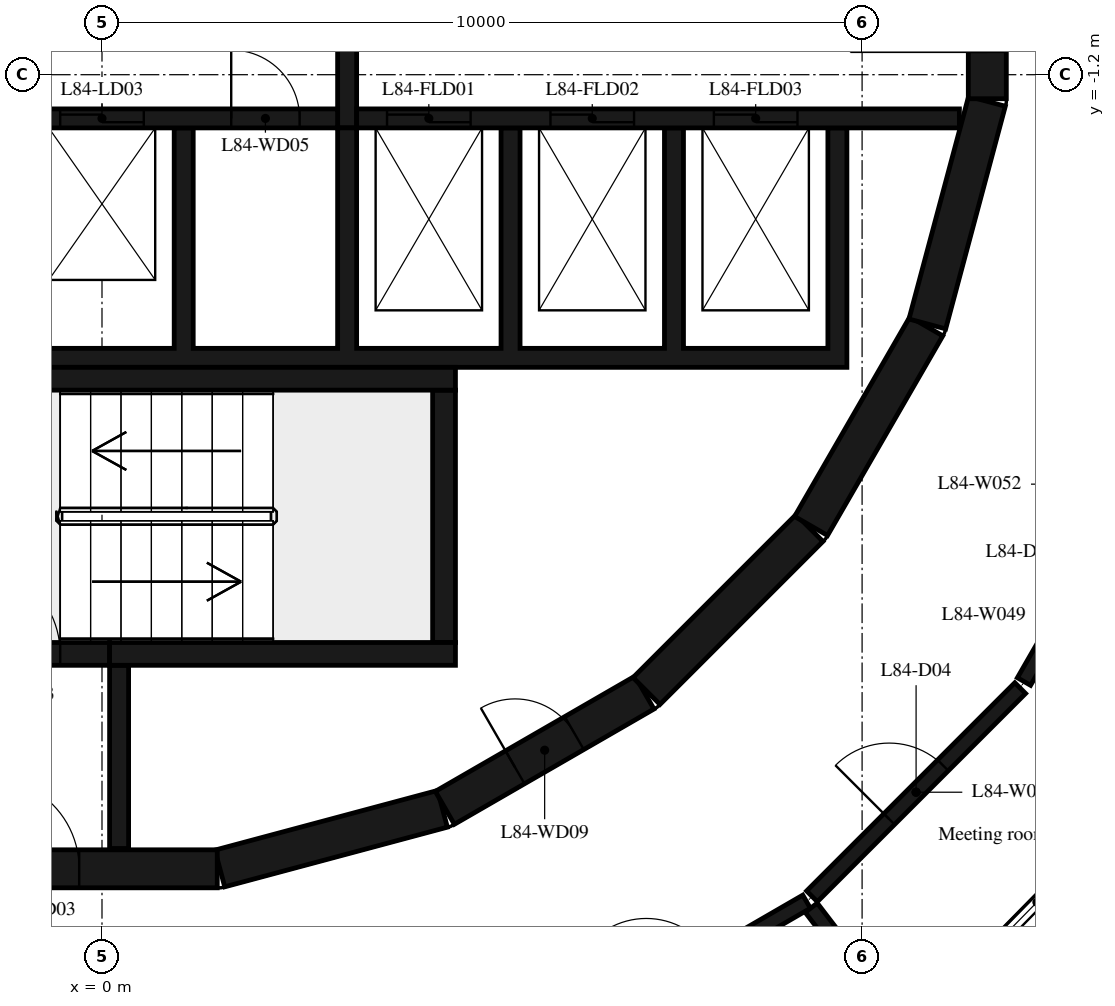
"""IFC4 building model, lengths in metres.
Left out: names, types, materials, properties, quantities, classifications, styles, units other than length and angle.
Written with IfcOpenShell. Run it as: python <this file> out.ifc"""

import sys

from ifc_helpers import new_model, si_unit, direction, frame, frame_2d, origin, place, context, subcontext, project, spatial, polyline, rectangle, outline, extrude, element, fill, save


model = new_model("IFC4")
c1 = context("Model", 3, precision=1e-05, world=origin(), true_north=direction((0.0, 1.0)))
c2 = subcontext(c1, "Body", "Model", "MODEL_VIEW")
j1 = project(units=[si_unit("LENGTHUNIT", "METRE"), si_unit("PLANEANGLEUNIT", "RADIAN")], contexts=[c1])
p1 = place(None, origin())
s1 = spatial("IfcSite", under=j1, at=p1, CompositionType="ELEMENT")
p2 = place(p1, origin())
s2 = spatial("IfcBuilding", under=s1, at=p2, CompositionType="ELEMENT")
p3 = place(p2, frame((0.0, 0.0, 326.2)))
s3 = spatial("IfcBuildingStorey", under=s2, at=p3, CompositionType="ELEMENT", Elevation=326.2)
p4 = place(p3, frame((1.55, -11.643, 0.0), z_axis=(0.0, 0.0, 1.0), x_axis=(0.965948410781, 0.258734743916, 0.0)))
e1 = element("IfcWall", 1, at=p4, inside=s3, PredefinedType="SHEAR", context=c2, shape_type="SweptSolid", body=[
    extrude(rectangle(XDim=3.033, YDim=0.5, at=frame_2d((1.516, 0.0))), origin(), (0.0, 0.0, 1.0), 6.35),
])
p5 = place(p3, frame((4.51, -10.845, 0.0), z_axis=(0.0, 0.0, 1.0), x_axis=(0.865975092491, 0.500087131594, 0.0)))
e2 = element("IfcWall", 2, at=p5, inside=s3, PredefinedType="SHEAR", context=c2, shape_type="SweptSolid", body=[
    extrude(rectangle(XDim=3.033, YDim=0.5, at=frame_2d((1.516, 0.0))), origin(), (0.0, 0.0, 1.0), 6.35),
])
p6 = place(p5, frame((1.066, 0.0, 0.0)))
e3 = element("IfcOpeningElement", 3, at=p6, cuts=e2, PredefinedType="OPENING", context=c2, shape_type="SweptSolid", body=[
    extrude(rectangle(XDim=0.9, YDim=2.1, at=frame_2d((0.45, 1.05))), frame((0.0, 0.26, 0.0), z_axis=(0.0, -1.0, 0.0), x_axis=(1.0, 0.0, 0.0)), (0.0, 0.0, 1.0), 0.52),
])
p7 = place(p3, frame((7.164, -9.308, 0.0), z_axis=(0.0, 0.0, 1.0), x_axis=(0.707106781187, 0.707106781187, 0.0)))
e4 = element("IfcWall", 4, at=p7, inside=s3, PredefinedType="SHEAR", context=c2, shape_type="SweptSolid", body=[
    extrude(rectangle(XDim=3.032, YDim=0.5, at=frame_2d((1.516, 0.0))), origin(), (0.0, 0.0, 1.0), 6.35),
])
for number, where, z_axis, x_axis in (
    (5, (9.329, -7.137, 0.0), (0.0, 0.0, 1.0), (0.5, 0.866, 0.0)),
    (6, (10.858, -4.479, 0.0), (0.0, 0.0, 1.0), (0.259, 0.966, 0.0)),
):
    element("IfcWall", number, at=place(p3, frame(where, z_axis=z_axis, x_axis=x_axis)), inside=s3, PredefinedType="SHEAR", context=c2, shape_type="SweptSolid", body=[
        extrude(rectangle(XDim=3.033, YDim=0.5, at=frame_2d((1.516, 0.0))), origin(), (0.0, 0.0, 1.0), 6.35),
    ])
p8 = place(p3, frame((11.647, -1.516, 0.0), z_axis=(0.0, 0.0, 1.0), x_axis=(0.0, 1.0, 0.0)))
e7 = element("IfcWall", 7, at=p8, inside=s3, PredefinedType="SHEAR", context=c2, shape_type="SweptSolid", body=[
    extrude(rectangle(XDim=3.033, YDim=0.5, at=frame_2d((1.516, 0.0))), origin(), (0.0, 0.0, 1.0), 6.35),
])
p9 = place(p8, frame((0.616, 0.0, 0.0)))
e8 = element("IfcOpeningElement", 8, at=p9, cuts=e7, PredefinedType="OPENING", context=c2, shape_type="SweptSolid", body=[
    extrude(rectangle(XDim=1.8, YDim=2.1, at=frame_2d((0.9, 1.05))), frame((0.0, 0.26, 0.0), z_axis=(0.0, -1.0, 0.0), x_axis=(1.0, 0.0, 0.0)), (0.0, 0.0, 1.0), 0.52),
])
p10 = place(p3, frame((-1.516, -11.647, 0.0), z_axis=(0.0, 0.0, 1.0), x_axis=(1.0, 0.0, 0.0)))
e9 = element("IfcWall", 9, at=p10, inside=s3, PredefinedType="SHEAR", context=c2, shape_type="SweptSolid", body=[
    extrude(rectangle(XDim=3.033, YDim=0.5, at=frame_2d((1.516, 0.0))), origin(), (0.0, 0.0, 1.0), 6.35),
])
p11 = place(p10, frame((0.016, 0.0, 0.0)))
e10 = element("IfcOpeningElement", 10, at=p11, cuts=e9, PredefinedType="OPENING", context=c2, shape_type="SweptSolid", body=[
    extrude(rectangle(XDim=1.2, YDim=2.1, at=frame_2d((0.6, 1.05))), frame((0.0, 0.26, 0.0), z_axis=(0.0, -1.0, 0.0), x_axis=(1.0, 0.0, 0.0)), (0.0, 0.0, 1.0), 0.52),
])
p12 = place(p3, frame((-2.4, -5.2, 0.0), z_axis=(0.0, 0.0, 1.0), x_axis=(1.0, 0.0, 0.0)))
e11 = element("IfcWall", 11, at=p12, inside=s3, PredefinedType="SHEAR", context=c2, shape_type="SweptSolid", body=[
    extrude(rectangle(XDim=7.05, YDim=0.3, at=frame_2d((3.525, 0.0))), origin(), (0.0, 0.0, 1.0), 6.35),
])
p13 = place(p3, frame((4.5, -8.67, 0.0), z_axis=(0.0, 0.0, 1.0), x_axis=(0.0, 1.0, 0.0)))
e12 = element("IfcWall", 12, at=p13, inside=s3, PredefinedType="SHEAR", context=c2, shape_type="SweptSolid", body=[
    extrude(rectangle(XDim=3.32, YDim=0.3, at=frame_2d((1.66, 0.0))), origin(), (0.0, 0.0, 1.0), 6.35),
])
p14 = place(p3, frame((0.1, -8.82, 0.0), z_axis=(0.0, 0.0, 1.0), x_axis=(1.0, 0.0, 0.0)))
e13 = element("IfcWall", 13, at=p14, inside=s3, PredefinedType="SHEAR", context=c2, shape_type="SweptSolid", body=[
    extrude(rectangle(XDim=4.55, YDim=0.3, at=frame_2d((2.275, 0.0))), origin(), (0.0, 0.0, 1.0), 6.35),
])
p15 = place(p3, frame((-2.4, -8.82, 0.0), z_axis=(0.0, 0.0, 1.0), x_axis=(1.0, 0.0, 0.0)))
e14 = element("IfcWall", 14, at=p15, inside=s3, PredefinedType="SHEAR", context=c2, shape_type="SweptSolid", body=[
    extrude(rectangle(XDim=2.5, YDim=0.3, at=frame_2d((1.25, 0.0))), origin(), (0.0, 0.0, 1.0), 6.35),
])
p16 = place(p15, frame((0.65, 0.0, 0.0)))
e15 = element("IfcOpeningElement", 15, at=p16, cuts=e14, PredefinedType="OPENING", context=c2, shape_type="SweptSolid", body=[
    extrude(rectangle(XDim=1.2, YDim=2.1, at=frame_2d((0.6, 1.05))), frame((0.0, 0.16, 0.0), z_axis=(0.0, -1.0, 0.0), x_axis=(1.0, 0.0, 0.0)), (0.0, 0.0, 1.0), 0.32),
])
p17 = place(p3, frame((0.225, -8.97, 0.0), z_axis=(0.0, 0.0, 1.0), x_axis=(0.0, -1.0, 0.0)))
e16 = element("IfcWall", 16, at=p17, inside=s3, PredefinedType="SHEAR", context=c2, shape_type="SweptSolid", body=[
    extrude(rectangle(XDim=2.41, YDim=0.25, at=frame_2d((1.205, 0.0))), origin(), (0.0, 0.0, 1.0), 6.35),
])
p18 = place(p3, origin())
e17 = element("IfcWall", 17, at=p18, inside=s3, PredefinedType="SHEAR", context=c2, shape_type="SweptSolid", body=[
    extrude(outline(polyline([(9.8, -5.05), (9.8, -4.8), (9.8, -1.9), (9.55, -1.9), (9.55, -4.8), (7.65, -4.8), (7.65, -1.9), (7.4, -1.9), (7.4, -4.8), (5.5, -4.8), (5.5, -1.9), (5.25, -1.9), (5.25, -4.8), (3.35, -4.8), (3.35, -1.9), (3.1, -1.9), (3.1, -4.8), (1.2, -4.8), (1.2, -1.9), (0.95, -1.9), (0.95, -4.8), (-0.95, -4.8), (-0.95, -1.9), (-1.2, -1.9), (-1.2, -4.8), (-3.1, -4.8), (-3.1, -1.9), (-3.35, -1.9), (-3.35, -4.8), (-5.25, -4.8), (-5.25, -1.9), (-5.5, -1.9), (-5.5, -4.8), (-9.55, -4.8), (-9.55, -1.9), (-9.8, -1.9), (-9.8, -4.8), (-9.8, -5.05), (9.8, -5.05)])), origin(), (0.0, 0.0, 1.0), 6.35),
])
p19 = place(p3, frame((-11.28, -1.775, 0.0), z_axis=(0.0, 0.0, 1.0), x_axis=(1.0, 0.0, 0.0)))
e18 = element("IfcWall", 18, at=p19, inside=s3, PredefinedType="SHEAR", context=c2, shape_type="SweptSolid", body=[
    extrude(rectangle(XDim=14.38, YDim=0.25, at=frame_2d((7.19, 0.0))), origin(), (0.0, 0.0, 1.0), 6.35),
])
p20 = place(p19, frame((6.43, 0.0, 0.0)))
e19 = element("IfcOpeningElement", 19, at=p20, cuts=e18, PredefinedType="OPENING", context=c2, shape_type="SweptSolid", body=[
    extrude(rectangle(XDim=1.1, YDim=2.1, at=frame_2d((0.55, 1.05))), frame((0.0, 0.135, 0.0), z_axis=(0.0, -1.0, 0.0), x_axis=(1.0, 0.0, 0.0)), (0.0, 0.0, 1.0), 0.27),
])
p21 = place(p19, frame((8.58, 0.0, 0.0)))
e20 = element("IfcOpeningElement", 20, at=p21, cuts=e18, PredefinedType="OPENING", context=c2, shape_type="SweptSolid", body=[
    extrude(rectangle(XDim=1.1, YDim=2.1, at=frame_2d((0.55, 1.05))), frame((0.0, 0.135, 0.0), z_axis=(0.0, -1.0, 0.0), x_axis=(1.0, 0.0, 0.0)), (0.0, 0.0, 1.0), 0.27),
])
p22 = place(p19, frame((10.73, 0.0, 0.0)))
e21 = element("IfcOpeningElement", 21, at=p22, cuts=e18, PredefinedType="OPENING", context=c2, shape_type="SweptSolid", body=[
    extrude(rectangle(XDim=1.1, YDim=2.1, at=frame_2d((0.55, 1.05))), frame((0.0, 0.135, 0.0), z_axis=(0.0, -1.0, 0.0), x_axis=(1.0, 0.0, 0.0)), (0.0, 0.0, 1.0), 0.27),
])
p23 = place(p19, frame((3.305, 0.0, 0.0)))
e22 = element("IfcOpeningElement", 22, at=p23, cuts=e18, PredefinedType="OPENING", context=c2, shape_type="SweptSolid", body=[
    extrude(rectangle(XDim=0.9, YDim=2.1, at=frame_2d((0.45, 1.05))), frame((0.0, 0.135, 0.0), z_axis=(0.0, -1.0, 0.0), x_axis=(1.0, 0.0, 0.0)), (0.0, 0.0, 1.0), 0.27),
])
p24 = place(p19, frame((12.98, 0.0, 0.0)))
e23 = element("IfcOpeningElement", 23, at=p24, cuts=e18, PredefinedType="OPENING", context=c2, shape_type="SweptSolid", body=[
    extrude(rectangle(XDim=0.9, YDim=2.1, at=frame_2d((0.45, 1.05))), frame((0.0, 0.135, 0.0), z_axis=(0.0, -1.0, 0.0), x_axis=(1.0, 0.0, 0.0)), (0.0, 0.0, 1.0), 0.27),
])
p25 = place(p3, frame((3.35, -1.775, 0.0), z_axis=(0.0, 0.0, 1.0), x_axis=(1.0, 0.0, 0.0)))
e24 = element("IfcWall", 24, at=p25, inside=s3, PredefinedType="SHEAR", context=c2, shape_type="SweptSolid", body=[
    extrude(rectangle(XDim=7.93, YDim=0.25, at=frame_2d((3.965, 0.0))), origin(), (0.0, 0.0, 1.0), 6.35),
])
p26 = place(p25, frame((0.4, 0.0, 0.0)))
e25 = element("IfcOpeningElement", 25, at=p26, cuts=e24, PredefinedType="OPENING", context=c2, shape_type="SweptSolid", body=[
    extrude(rectangle(XDim=1.1, YDim=2.4, at=frame_2d((0.55, 1.2))), frame((0.0, 0.135, 0.0), z_axis=(0.0, -1.0, 0.0), x_axis=(1.0, 0.0, 0.0)), (0.0, 0.0, 1.0), 0.27),
])
p27 = place(p25, frame((2.55, 0.0, 0.0)))
e26 = element("IfcOpeningElement", 26, at=p27, cuts=e24, PredefinedType="OPENING", context=c2, shape_type="SweptSolid", body=[
    extrude(rectangle(XDim=1.1, YDim=2.4, at=frame_2d((0.55, 1.2))), frame((0.0, 0.135, 0.0), z_axis=(0.0, -1.0, 0.0), x_axis=(1.0, 0.0, 0.0)), (0.0, 0.0, 1.0), 0.27),
])
p28 = place(p25, frame((4.7, 0.0, 0.0)))
e27 = element("IfcOpeningElement", 27, at=p28, cuts=e24, PredefinedType="OPENING", context=c2, shape_type="SweptSolid", body=[
    extrude(rectangle(XDim=1.1, YDim=2.4, at=frame_2d((0.55, 1.2))), frame((0.0, 0.135, 0.0), z_axis=(0.0, -1.0, 0.0), x_axis=(1.0, 0.0, 0.0)), (0.0, 0.0, 1.0), 0.27),
])
p29 = place(p3, frame((3.225, -1.9, 0.0), z_axis=(0.0, 0.0, 1.0), x_axis=(0.0, 1.0, 0.0)))
e28 = element("IfcWall", 28, at=p29, inside=s3, PredefinedType="SHEAR", context=c2, shape_type="SweptSolid", body=[
    extrude(rectangle(XDim=3.8, YDim=0.25, at=frame_2d((1.9, 0.0))), origin(), (0.0, 0.0, 1.0), 6.35),
])
p30 = place(p3, frame((5.917, -14.02, 0.0), z_axis=(0.0, 0.0, 1.0), x_axis=(0.865601686425, 0.500733182901, 0.0)))
e29 = element("IfcWall", 29, at=p30, inside=s3, PredefinedType="PARTITIONING", context=c2, shape_type="SweptSolid", body=[
    extrude(rectangle(XDim=3.874, YDim=0.2, at=frame_2d((1.937, 0.0))), origin(), (0.0, 0.0, 1.0), 6.35),
])
p31 = place(p30, frame((1.437, 0.0, 0.0)))
e30 = element("IfcOpeningElement", 30, at=p31, cuts=e29, PredefinedType="OPENING", context=c2, shape_type="SweptSolid", body=[
    extrude(rectangle(XDim=1.0, YDim=2.1, at=frame_2d((0.5, 1.05))), frame((0.0, 0.11, 0.0), z_axis=(0.0, -1.0, 0.0), x_axis=(1.0, 0.0, 0.0)), (0.0, 0.0, 1.0), 0.22),
])
p32 = place(p3, frame((9.331, -12.159, 0.0), z_axis=(0.0, 0.0, 1.0), x_axis=(0.608367605518, -0.793655376442, 0.0)))
e31 = element("IfcWall", 31, at=p32, inside=s3, PredefinedType="PARTITIONING", context=c2, shape_type="SweptSolid", body=[
    extrude(rectangle(XDim=2.004, YDim=0.2, at=frame_2d((1.002, 0.0))), origin(), (0.0, 0.0, 1.0), 6.35),
])
p33 = place(p3, frame((9.341, -12.009, 0.0), z_axis=(0.0, 0.0, 1.0), x_axis=(0.707106781187, 0.707106781187, 0.0)))
e32 = element("IfcWall", 32, at=p33, inside=s3, PredefinedType="PARTITIONING", context=c2, shape_type="SweptSolid", body=[
    extrude(rectangle(XDim=3.874, YDim=0.2, at=frame_2d((1.937, 0.0))), origin(), (0.0, 0.0, 1.0), 6.35),
])
p34 = place(p33, frame((1.437, 0.0, 0.0)))
e33 = element("IfcOpeningElement", 33, at=p34, cuts=e32, PredefinedType="OPENING", context=c2, shape_type="SweptSolid", body=[
    extrude(rectangle(XDim=1.0, YDim=2.1, at=frame_2d((0.5, 1.05))), frame((0.0, 0.11, 0.0), z_axis=(0.0, -1.0, 0.0), x_axis=(1.0, 0.0, 0.0)), (0.0, 0.0, 1.0), 0.22),
])
p35 = place(p3, frame((12.13, -9.183, 0.0), z_axis=(0.0, 0.0, 1.0), x_axis=(0.499137424967, 0.866522839282, 0.0)))
e34 = element("IfcWall", 34, at=p35, inside=s3, PredefinedType="PARTITIONING", context=c2, shape_type="SweptSolid", body=[
    extrude(rectangle(XDim=2.023, YDim=0.2, at=frame_2d((1.012, 0.0))), origin(), (0.0, 0.0, 1.0), 6.35),
])
p36 = place(p16, origin())
e35 = element("IfcDoor", 35, at=p36, inside=s3, OperationType="SINGLE_SWING_LEFT", PredefinedType="DOOR", context=c2, shape_type="SweptSolid", body=[
    extrude(rectangle(XDim=1.2, YDim=2.1, at=frame_2d((0.6, 1.05))), frame((0.0, 0.025, 0.0), z_axis=(0.0, -1.0, 0.0), x_axis=(1.0, 0.0, 0.0)), (0.0, 0.0, 1.0), 0.05),
])
fill(e15, e35)
p37 = place(p11, origin())
e36 = element("IfcDoor", 36, at=p37, inside=s3, OperationType="SINGLE_SWING_RIGHT", PredefinedType="DOOR", context=c2, shape_type="SweptSolid", body=[
    extrude(rectangle(XDim=1.2, YDim=2.1, at=frame_2d((0.6, 1.05))), frame((0.0, 0.025, 0.0), z_axis=(0.0, -1.0, 0.0), x_axis=(1.0, 0.0, 0.0)), (0.0, 0.0, 1.0), 0.05),
])
fill(e10, e36)
p38 = place(p9, origin())
e37 = element("IfcDoor", 37, at=p38, inside=s3, OperationType="DOUBLE_DOOR_SINGLE_SWING", PredefinedType="DOOR", context=c2, shape_type="SweptSolid", body=[
    extrude(rectangle(XDim=1.8, YDim=2.1, at=frame_2d((0.9, 1.05))), frame((0.0, 0.025, 0.0), z_axis=(0.0, -1.0, 0.0), x_axis=(1.0, 0.0, 0.0)), (0.0, 0.0, 1.0), 0.05),
])
fill(e8, e37)
p39 = place(p22, origin())
e38 = element("IfcDoor", 38, at=p39, inside=s3, OperationType="DOUBLE_DOOR_SLIDING", PredefinedType="DOOR", context=c2, shape_type="SweptSolid", body=[
    extrude(rectangle(XDim=1.1, YDim=2.1, at=frame_2d((0.55, 1.05))), frame((0.0, 0.025, 0.0), z_axis=(0.0, -1.0, 0.0), x_axis=(1.0, 0.0, 0.0)), (0.0, 0.0, 1.0), 0.05),
])
fill(e21, e38)
p40 = place(p26, origin())
e39 = element("IfcDoor", 39, at=p40, inside=s3, OperationType="DOUBLE_DOOR_SLIDING", PredefinedType="DOOR", context=c2, shape_type="SweptSolid", body=[
    extrude(rectangle(XDim=1.1, YDim=2.4, at=frame_2d((0.55, 1.2))), frame((0.0, 0.025, 0.0), z_axis=(0.0, -1.0, 0.0), x_axis=(1.0, 0.0, 0.0)), (0.0, 0.0, 1.0), 0.05),
])
fill(e25, e39)
p41 = place(p27, origin())
e40 = element("IfcDoor", 40, at=p41, inside=s3, OperationType="DOUBLE_DOOR_SLIDING", PredefinedType="DOOR", context=c2, shape_type="SweptSolid", body=[
    extrude(rectangle(XDim=1.1, YDim=2.4, at=frame_2d((0.55, 1.2))), frame((0.0, 0.025, 0.0), z_axis=(0.0, -1.0, 0.0), x_axis=(1.0, 0.0, 0.0)), (0.0, 0.0, 1.0), 0.05),
])
fill(e26, e40)
p42 = place(p28, origin())
e41 = element("IfcDoor", 41, at=p42, inside=s3, OperationType="DOUBLE_DOOR_SLIDING", PredefinedType="DOOR", context=c2, shape_type="SweptSolid", body=[
    extrude(rectangle(XDim=1.1, YDim=2.4, at=frame_2d((0.55, 1.2))), frame((0.0, 0.025, 0.0), z_axis=(0.0, -1.0, 0.0), x_axis=(1.0, 0.0, 0.0)), (0.0, 0.0, 1.0), 0.05),
])
fill(e27, e41)
p43 = place(p24, origin())
e42 = element("IfcDoor", 42, at=p43, inside=s3, OperationType="SINGLE_SWING_LEFT", PredefinedType="DOOR", context=c2, shape_type="SweptSolid", body=[
    extrude(rectangle(XDim=0.9, YDim=2.1, at=frame_2d((0.45, 1.05))), frame((0.0, 0.025, 0.0), z_axis=(0.0, -1.0, 0.0), x_axis=(1.0, 0.0, 0.0)), (0.0, 0.0, 1.0), 0.05),
])
fill(e23, e42)
p44 = place(p6, origin())
e43 = element("IfcDoor", 43, at=p44, inside=s3, OperationType="SINGLE_SWING_LEFT", PredefinedType="DOOR", context=c2, shape_type="SweptSolid", body=[
    extrude(rectangle(XDim=0.9, YDim=2.1, at=frame_2d((0.45, 1.05))), frame((0.0, 0.025, 0.0), z_axis=(0.0, -1.0, 0.0), x_axis=(1.0, 0.0, 0.0)), (0.0, 0.0, 1.0), 0.05),
])
fill(e3, e43)
p45 = place(p34, origin())
e44 = element("IfcDoor", 44, at=p45, inside=s3, OperationType="SINGLE_SWING_LEFT", PredefinedType="DOOR", context=c2, shape_type="SweptSolid", body=[
    extrude(rectangle(XDim=1.0, YDim=2.1, at=frame_2d((0.5, 1.05))), frame((0.0, 0.025, 0.0), z_axis=(0.0, -1.0, 0.0), x_axis=(1.0, 0.0, 0.0)), (0.0, 0.0, 1.0), 0.05),
])
fill(e33, e44)
save(model, sys.argv[1])
